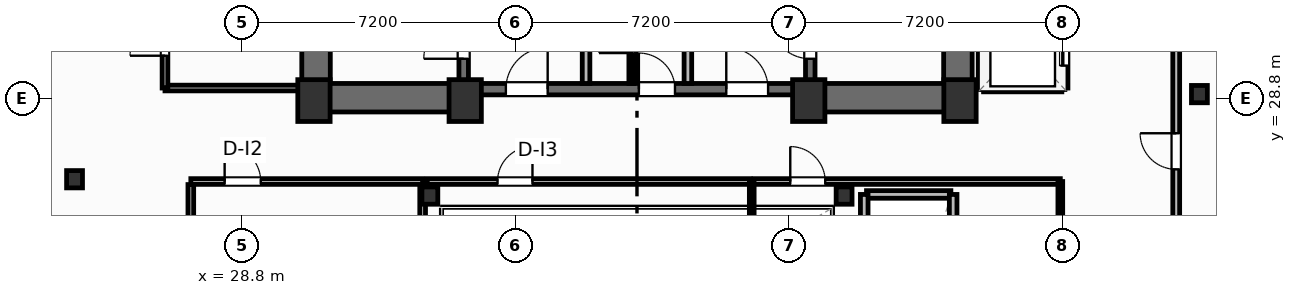
"""IFC4 building model, lengths in metres.
Left out: names, types, materials, properties, quantities, classifications, styles, units other than length and angle.
Written with IfcOpenShell. Run it as: python <this file> out.ifc"""

import sys

from ifc_helpers import new_model, si_unit, direction, frame, frame_2d, origin, origin_2d, place, context, subcontext, project, spatial, rectangle, i_section, extrude, element, fill, save


model = new_model("IFC4")
c1 = context("Model", 3, precision=1e-05, world=origin(), true_north=direction((0.0, 1.0)))
c2 = subcontext(c1, "Body", "Model", "MODEL_VIEW")
j1 = project(units=[si_unit("LENGTHUNIT", "METRE"), si_unit("PLANEANGLEUNIT", "RADIAN")], contexts=[c1])
p1 = place(None, origin())
s1 = spatial("IfcSite", under=j1, at=p1, CompositionType="ELEMENT")
p2 = place(p1, origin())
s2 = spatial("IfcBuilding", under=s1, at=p2, CompositionType="ELEMENT")
p3 = place(p2, frame((0.0, 0.0, 158.7)))
s3 = spatial("IfcBuildingStorey", under=s2, at=p3, CompositionType="ELEMENT", Elevation=158.7)
for number, where, z_axis, x_axis in (
    (1, (30.7, 28.75, 0.0), (0.0, 0.0, 1.0), (1.0, 0.0, 0.0)),
    (2, (34.68, 28.75, 0.0), (0.0, 0.0, 1.0), (1.0, 0.0, 0.0)),
    (3, (43.72, 28.75, 0.0), (0.0, 0.0, 1.0), (1.0, 0.0, 0.0)),
    (4, (47.7, 28.75, 0.0), (0.0, 0.0, 1.0), (1.0, 0.0, 0.0)),
):
    element("IfcColumn", number, at=place(p3, frame(where, z_axis=z_axis, x_axis=x_axis)), inside=s3, PredefinedType="COLUMN", context=c2, shape_type="SweptSolid", body=[
        extrude(rectangle(XDim=0.85, YDim=1.1, at=origin_2d()), origin(), (0.0, 0.0, 1.0), 3.7),
    ])
for number, where, z_axis, x_axis in (
    (5, (33.75, 26.25, 0.0), (0.0, 0.0, 1.0), (1.0, 0.0, 0.0)),
    (6, (44.65, 26.25, 0.0), (0.0, 0.0, 1.0), (1.0, 0.0, 0.0)),
    (7, (24.4, 26.68, 0.0), (0.0, 0.0, 1.0), (1.0, 0.0, 0.0)),
    (8, (54.0, 28.92, 0.0), (0.0, 0.0, 1.0), (1.0, 0.0, 0.0)),
):
    element("IfcColumn", number, at=place(p3, frame(where, z_axis=z_axis, x_axis=x_axis)), inside=s3, PredefinedType="COLUMN", context=c2, shape_type="SweptSolid", body=[
        extrude(i_section(OverallWidth=0.418, OverallDepth=0.455, WebThickness=0.042, FlangeThickness=0.068, FilletRadius=0.025, at=origin_2d()), origin(), (0.0, 0.0, 1.0), 3.7),
    ])
for number, where, z_axis, x_axis in (
    (9, (30.755, 29.2, 0.0), (0.0, 0.0, 1.0), (0.0, 1.0, 0.0)),
    (10, (47.645, 29.2, 0.0), (0.0, 0.0, 1.0), (0.0, 1.0, 0.0)),
):
    element("IfcWall", number, at=place(p3, frame(where, z_axis=z_axis, x_axis=x_axis)), inside=s3, PredefinedType="SHEAR", context=c2, shape_type="SweptSolid", body=[
        extrude(rectangle(XDim=9.22, YDim=0.75, at=frame_2d((4.61, 0.0))), origin(), (0.0, 0.0, 1.0), 3.38),
    ])
p4 = place(p3, frame((30.38, 28.825, 0.0), z_axis=(0.0, 0.0, 1.0), x_axis=(1.0, 0.0, 0.0)))
e11 = element("IfcWall", 11, at=p4, inside=s3, PredefinedType="SHEAR", context=c2, shape_type="SweptSolid", body=[
    extrude(rectangle(XDim=4.42, YDim=0.75, at=frame_2d((2.21, 0.0))), origin(), (0.0, 0.0, 1.0), 3.38),
])
p5 = place(p3, frame((43.6, 28.825, 0.0), z_axis=(0.0, 0.0, 1.0), x_axis=(1.0, 0.0, 0.0)))
e12 = element("IfcWall", 12, at=p5, inside=s3, PredefinedType="SHEAR", context=c2, shape_type="SweptSolid", body=[
    extrude(rectangle(XDim=4.42, YDim=0.75, at=frame_2d((2.21, 0.0))), origin(), (0.0, 0.0, 1.0), 3.38),
])
p6 = place(p3, frame((34.8, 29.05, 0.0), z_axis=(0.0, 0.0, 1.0), x_axis=(1.0, 0.0, 0.0)))
e13 = element("IfcWall", 13, at=p6, inside=s3, PredefinedType="SHEAR", context=c2, shape_type="SweptSolid", body=[
    extrude(rectangle(XDim=8.8, YDim=0.3, at=frame_2d((4.4, 0.0))), origin(), (0.0, 0.0, 1.0), 3.38),
])
p7 = place(p6, frame((0.95, 0.0, 0.0)))
e14 = element("IfcOpeningElement", 14, at=p7, cuts=e13, PredefinedType="OPENING", context=c2, shape_type="SweptSolid", body=[
    extrude(rectangle(XDim=1.1, YDim=2.15, at=frame_2d((0.55, 1.075))), frame((0.0, 0.16, 0.0), z_axis=(0.0, -1.0, 0.0), x_axis=(1.0, 0.0, 0.0)), (0.0, 0.0, 1.0), 0.32),
])
p8 = place(p6, frame((6.75, 0.0, 0.0)))
e15 = element("IfcOpeningElement", 15, at=p8, cuts=e13, PredefinedType="OPENING", context=c2, shape_type="SweptSolid", body=[
    extrude(rectangle(XDim=1.1, YDim=2.15, at=frame_2d((0.55, 1.075))), frame((0.0, 0.16, 0.0), z_axis=(0.0, -1.0, 0.0), x_axis=(1.0, 0.0, 0.0)), (0.0, 0.0, 1.0), 0.32),
])
p9 = place(p6, frame((4.45, 0.0, 0.0)))
e16 = element("IfcOpeningElement", 16, at=p9, cuts=e13, PredefinedType="OPENING", context=c2, shape_type="SweptSolid", body=[
    extrude(rectangle(XDim=0.95, YDim=2.15, at=frame_2d((0.475, 1.075))), frame((0.0, 0.16, 0.0), z_axis=(0.0, -1.0, 0.0), x_axis=(1.0, 0.0, 0.0)), (0.0, 0.0, 1.0), 0.32),
])
p10 = place(p3, frame((34.64, 29.2, 0.0), z_axis=(0.0, 0.0, 1.0), x_axis=(0.0, 1.0, 0.0)))
e17 = element("IfcWall", 17, at=p10, inside=s3, PredefinedType="SHEAR", context=c2, shape_type="SweptSolid", body=[
    extrude(rectangle(XDim=9.22, YDim=0.25, at=frame_2d((4.61, 0.0))), origin(), (0.0, 0.0, 1.0), 3.38),
])
p11 = place(p10, frame((0.65, 0.0, 0.0)))
e18 = element("IfcOpeningElement", 18, at=p11, cuts=e17, PredefinedType="OPENING", context=c2, shape_type="SweptSolid", body=[
    extrude(rectangle(XDim=1.05, YDim=2.15, at=frame_2d((0.525, 1.075))), frame((0.0, 0.135, 0.0), z_axis=(0.0, -1.0, 0.0), x_axis=(1.0, 0.0, 0.0)), (0.0, 0.0, 1.0), 0.27),
])
p12 = place(p3, frame((43.76, 29.2, 0.0), z_axis=(0.0, 0.0, 1.0), x_axis=(0.0, 1.0, 0.0)))
e19 = element("IfcWall", 19, at=p12, inside=s3, PredefinedType="SHEAR", context=c2, shape_type="SweptSolid", body=[
    extrude(rectangle(XDim=9.22, YDim=0.25, at=frame_2d((4.61, 0.0))), origin(), (0.0, 0.0, 1.0), 3.38),
])
p13 = place(p12, frame((0.65, 0.0, 0.0)))
e20 = element("IfcOpeningElement", 20, at=p13, cuts=e19, PredefinedType="OPENING", context=c2, shape_type="SweptSolid", body=[
    extrude(rectangle(XDim=1.05, YDim=2.15, at=frame_2d((0.525, 1.075))), frame((0.0, 0.135, 0.0), z_axis=(0.0, -1.0, 0.0), x_axis=(1.0, 0.0, 0.0)), (0.0, 0.0, 1.0), 0.27),
])
p14 = place(p3, frame((33.68, 26.62, 0.0), z_axis=(0.0, 0.0, 1.0), x_axis=(1.0, 0.0, 0.0)))
e21 = element("IfcWall", 21, at=p14, inside=s3, PredefinedType="PARTITIONING", context=c2, shape_type="SweptSolid", body=[
    extrude(rectangle(XDim=8.5, YDim=0.15, at=frame_2d((4.25, 0.0))), origin(), (0.0, 0.0, 1.0), 3.38),
])
p15 = place(p14, frame((1.85, 0.0, 0.0)))
e22 = element("IfcOpeningElement", 22, at=p15, cuts=e21, PredefinedType="OPENING", context=c2, shape_type="SweptSolid", body=[
    extrude(rectangle(XDim=0.92, YDim=2.05, at=frame_2d((0.46, 1.025))), frame((0.0, 0.085, 0.0), z_axis=(0.0, -1.0, 0.0), x_axis=(1.0, 0.0, 0.0)), (0.0, 0.0, 1.0), 0.17),
])
p16 = place(p3, frame((42.22, 19.32, 0.0), z_axis=(0.0, 0.0, 1.0), x_axis=(0.0, 1.0, 0.0)))
e23 = element("IfcWall", 23, at=p16, inside=s3, PredefinedType="PARTITIONING", context=c2, shape_type="SweptSolid", body=[
    extrude(rectangle(XDim=7.3, YDim=0.125, at=frame_2d((3.65, 0.0))), origin(), (0.0, 0.0, 1.0), 3.38),
])
p17 = place(p3, frame((42.28, 26.62, 0.0), z_axis=(0.0, 0.0, 1.0), x_axis=(1.0, 0.0, 0.0)))
e24 = element("IfcWall", 24, at=p17, inside=s3, PredefinedType="PARTITIONING", context=c2, shape_type="SweptSolid", body=[
    extrude(rectangle(XDim=8.06, YDim=0.15, at=frame_2d((4.03, 0.0))), origin(), (0.0, 0.0, 1.0), 3.38),
])
p18 = place(p17, frame((0.954, 0.0, 0.0)))
e25 = element("IfcOpeningElement", 25, at=p18, cuts=e24, PredefinedType="OPENING", context=c2, shape_type="SweptSolid", body=[
    extrude(rectangle(XDim=0.92, YDim=2.05, at=frame_2d((0.46, 1.025))), frame((0.0, 0.085, 0.0), z_axis=(0.0, -1.0, 0.0), x_axis=(1.0, 0.0, 0.0)), (0.0, 0.0, 1.0), 0.17),
])
p19 = place(p3, frame((50.34, 19.32, 0.0), z_axis=(0.0, 0.0, 1.0), x_axis=(0.0, 1.0, 0.0)))
e26 = element("IfcWall", 26, at=p19, inside=s3, PredefinedType="PARTITIONING", context=c2, shape_type="SweptSolid", body=[
    extrude(rectangle(XDim=7.3, YDim=0.125, at=frame_2d((3.65, 0.0))), origin(), (0.0, 0.0, 1.0), 3.38),
])
p20 = place(p3, frame((53.39, 19.24, 0.0), z_axis=(0.0, 0.0, 1.0), x_axis=(0.0, 1.0, 0.0)))
e27 = element("IfcWall", 27, at=p20, inside=s3, PredefinedType="PARTITIONING", context=c2, shape_type="SweptSolid", body=[
    extrude(rectangle(XDim=20.06, YDim=0.18, at=frame_2d((10.03, 0.0))), origin(), (0.0, 0.0, 1.0), 3.38),
])
p21 = place(p20, frame((7.7, 0.0, 0.0)))
e28 = element("IfcOpeningElement", 28, at=p21, cuts=e27, PredefinedType="OPENING", context=c2, shape_type="SweptSolid", body=[
    extrude(rectangle(XDim=0.95, YDim=2.05, at=frame_2d((0.475, 1.025))), frame((0.0, 0.1, 0.0), z_axis=(0.0, -1.0, 0.0), x_axis=(1.0, 0.0, 0.0)), (0.0, 0.0, 1.0), 0.2),
])
for number, where, z_axis, x_axis in (
    (29, (37.86, 29.2, 0.0), (0.0, 0.0, 1.0), (0.0, 1.0, 0.0)),
    (30, (40.54, 29.2, 0.0), (0.0, 0.0, 1.0), (0.0, 1.0, 0.0)),
):
    element("IfcWall", number, at=place(p3, frame(where, z_axis=z_axis, x_axis=x_axis)), inside=s3, PredefinedType="PARTITIONING", context=c2, shape_type="SweptSolid", body=[
        extrude(rectangle(XDim=5.18, YDim=0.2, at=frame_2d((2.59, 0.0))), origin(), (0.0, 0.0, 1.0), 3.38),
    ])
p22 = place(p3, frame((39.05, 29.2, 0.0), z_axis=(0.0, 0.0, 1.0), x_axis=(0.0, 1.0, 0.0)))
e31 = element("IfcWall", 31, at=p22, inside=s3, PredefinedType="PARTITIONING", context=c2, shape_type="SweptSolid", body=[
    extrude(rectangle(XDim=5.22, YDim=0.125, at=frame_2d((2.61, 0.0))), origin(), (0.0, 0.0, 1.0), 3.38),
])
p23 = place(p22, frame((0.8, 0.0, 0.0)))
e32 = element("IfcOpeningElement", 32, at=p23, cuts=e31, PredefinedType="OPENING", context=c2, shape_type="SweptSolid", body=[
    extrude(rectangle(XDim=0.85, YDim=2.05, at=frame_2d((0.425, 1.025))), frame((0.0, 0.073, 0.0), z_axis=(0.0, -1.0, 0.0), x_axis=(1.0, 0.0, 0.0)), (0.0, 0.0, 1.0), 0.145),
])
p24 = place(p22, frame((3.4, 0.0, 0.0)))
e33 = element("IfcOpeningElement", 33, at=p24, cuts=e31, PredefinedType="OPENING", context=c2, shape_type="SweptSolid", body=[
    extrude(rectangle(XDim=0.85, YDim=2.05, at=frame_2d((0.425, 1.025))), frame((0.0, 0.073, 0.0), z_axis=(0.0, -1.0, 0.0), x_axis=(1.0, 0.0, 0.0)), (0.0, 0.0, 1.0), 0.145),
])
p25 = place(p3, frame((27.46, 26.62, 0.0), z_axis=(0.0, 0.0, 1.0), x_axis=(1.0, 0.0, 0.0)))
e34 = element("IfcWall", 34, at=p25, inside=s3, PredefinedType="PARTITIONING", context=c2, shape_type="SweptSolid", body=[
    extrude(rectangle(XDim=6.1, YDim=0.15, at=frame_2d((3.05, 0.0))), origin(), (0.0, 0.0, 1.0), 2.592),
])
p26 = place(p25, frame((0.89, 0.0, 0.0)))
e35 = element("IfcOpeningElement", 35, at=p26, cuts=e34, PredefinedType="OPENING", context=c2, shape_type="SweptSolid", body=[
    extrude(rectangle(XDim=0.95, YDim=2.05, at=frame_2d((0.475, 1.025))), frame((0.0, 0.085, 0.0), z_axis=(0.0, -1.0, 0.0), x_axis=(1.0, 0.0, 0.0)), (0.0, 0.0, 1.0), 0.17),
])
p27 = place(p3, frame((27.46, 19.38, 0.0), z_axis=(0.0, 0.0, 1.0), x_axis=(0.0, 1.0, 0.0)))
e36 = element("IfcWall", 36, at=p27, inside=s3, PredefinedType="PARTITIONING", context=c2, shape_type="SweptSolid", body=[
    extrude(rectangle(XDim=7.16, YDim=0.15, at=frame_2d((3.58, 0.0))), origin(), (0.0, 0.0, 1.0), 3.38),
])
p28 = place(p27, frame((1.1, 0.0, 0.0)))
e37 = element("IfcOpeningElement", 37, at=p28, cuts=e36, PredefinedType="OPENING", context=c2, shape_type="SweptSolid", body=[
    extrude(rectangle(XDim=0.9, YDim=2.05, at=frame_2d((0.45, 1.025))), frame((0.0, 0.085, 0.0), z_axis=(0.0, -1.0, 0.0), x_axis=(1.0, 0.0, 0.0)), (0.0, 0.0, 1.0), 0.17),
])
p29 = place(p3, frame((33.56, 19.38, 0.0), z_axis=(0.0, 0.0, 1.0), x_axis=(0.0, 1.0, 0.0)))
e38 = element("IfcWall", 38, at=p29, inside=s3, PredefinedType="PARTITIONING", context=c2, shape_type="SweptSolid", body=[
    extrude(rectangle(XDim=7.16, YDim=0.15, at=frame_2d((3.58, 0.0))), origin(), (0.0, 0.0, 1.0), 2.754),
])
p30 = place(p3, frame((26.78, 29.08, 0.0), z_axis=(0.0, 0.0, 1.0), x_axis=(1.0, 0.0, 0.0)))
e39 = element("IfcWall", 39, at=p30, inside=s3, PredefinedType="PARTITIONING", context=c2, shape_type="SweptSolid", body=[
    extrude(rectangle(XDim=3.6, YDim=0.15, at=frame_2d((1.8, 0.0))), origin(), (0.0, 0.0, 1.0), 3.38),
])
p31 = place(p3, frame((26.78, 29.08, 0.0), z_axis=(0.0, 0.0, 1.0), x_axis=(0.0, 1.0, 0.0)))
e40 = element("IfcWall", 40, at=p31, inside=s3, PredefinedType="PARTITIONING", context=c2, shape_type="SweptSolid", body=[
    extrude(rectangle(XDim=5.87, YDim=0.15, at=frame_2d((2.935, 0.0))), origin(), (0.0, 0.0, 1.0), 3.38),
])
p32 = place(p31, frame((0.85, 0.0, 0.0)))
e41 = element("IfcOpeningElement", 41, at=p32, cuts=e40, PredefinedType="OPENING", context=c2, shape_type="SweptSolid", body=[
    extrude(rectangle(XDim=0.92, YDim=2.05, at=frame_2d((0.46, 1.025))), frame((0.0, 0.085, 0.0), z_axis=(0.0, -1.0, 0.0), x_axis=(1.0, 0.0, 0.0)), (0.0, 0.0, 1.0), 0.17),
])
p33 = place(p31, frame((3.45, 0.0, 0.0)))
e42 = element("IfcOpeningElement", 42, at=p33, cuts=e40, PredefinedType="OPENING", context=c2, shape_type="SweptSolid", body=[
    extrude(rectangle(XDim=0.85, YDim=2.05, at=frame_2d((0.425, 1.025))), frame((0.0, 0.085, 0.0), z_axis=(0.0, -1.0, 0.0), x_axis=(1.0, 0.0, 0.0)), (0.0, 0.0, 1.0), 0.17),
])
p34 = place(p3, frame((48.32, 29.08, 0.0), z_axis=(0.0, 0.0, 1.0), x_axis=(1.0, 0.0, 0.0)))
e43 = element("IfcWall", 43, at=p34, inside=s3, PredefinedType="PARTITIONING", context=c2, shape_type="SweptSolid", body=[
    extrude(rectangle(XDim=2.06, YDim=0.2, at=frame_2d((1.03, 0.0))), origin(), (0.0, 0.0, 1.0), 2.592),
])
p35 = place(p3, frame((48.28, 29.08, 0.0), z_axis=(0.0, 0.0, 1.0), x_axis=(0.0, 1.0, 0.0)))
e44 = element("IfcWall", 44, at=p35, inside=s3, PredefinedType="PARTITIONING", context=c2, shape_type="SweptSolid", body=[
    extrude(rectangle(XDim=6.89, YDim=0.2, at=frame_2d((3.445, 0.0))), origin(), (0.0, 0.0, 1.0), 3.38),
])
p36 = place(p3, frame((50.44, 29.08, 0.0), z_axis=(0.0, 0.0, 1.0), x_axis=(0.0, 1.0, 0.0)))
e45 = element("IfcWall", 45, at=p36, inside=s3, PredefinedType="PARTITIONING", context=c2, shape_type="SweptSolid", body=[
    extrude(rectangle(XDim=6.89, YDim=0.2, at=frame_2d((3.445, 0.0))), origin(), (0.0, 0.0, 1.0), 3.38),
])
p37 = place(p36, frame((0.59, 0.0, 0.0)))
e46 = element("IfcOpeningElement", 46, at=p37, cuts=e45, PredefinedType="OPENING", context=c2, shape_type="SweptSolid", body=[
    extrude(rectangle(XDim=1.1, YDim=2.15, at=frame_2d((0.55, 1.075))), frame((0.0, 0.11, 0.0), z_axis=(0.0, -1.0, 0.0), x_axis=(1.0, 0.0, 0.0)), (0.0, 0.0, 1.0), 0.22),
])
p38 = place(p36, frame((2.89, 0.0, 0.0)))
e47 = element("IfcOpeningElement", 47, at=p38, cuts=e45, PredefinedType="OPENING", context=c2, shape_type="SweptSolid", body=[
    extrude(rectangle(XDim=1.1, YDim=2.15, at=frame_2d((0.55, 1.075))), frame((0.0, 0.11, 0.0), z_axis=(0.0, -1.0, 0.0), x_axis=(1.0, 0.0, 0.0)), (0.0, 0.0, 1.0), 0.22),
])
p39 = place(p36, frame((5.19, 0.0, 0.0)))
e48 = element("IfcOpeningElement", 48, at=p39, cuts=e45, PredefinedType="OPENING", context=c2, shape_type="SweptSolid", body=[
    extrude(rectangle(XDim=1.1, YDim=2.15, at=frame_2d((0.55, 1.075))), frame((0.0, 0.11, 0.0), z_axis=(0.0, -1.0, 0.0), x_axis=(1.0, 0.0, 0.0)), (0.0, 0.0, 1.0), 0.22),
])
p40 = place(p3, frame((45.24, 26.28, 0.0), z_axis=(0.0, 0.0, 1.0), x_axis=(1.0, 0.0, 0.0)))
e49 = element("IfcWall", 49, at=p40, inside=s3, PredefinedType="PARTITIONING", context=c2, shape_type="SweptSolid", body=[
    extrude(rectangle(XDim=2.22, YDim=0.2, at=frame_2d((1.11, 0.0))), origin(), (0.0, 0.0, 1.0), 3.38),
])
for number, where, z_axis, x_axis in (
    (50, (45.18, 19.38, 0.0), (0.0, 0.0, 1.0), (0.0, 1.0, 0.0)),
    (51, (47.52, 19.38, 0.0), (0.0, 0.0, 1.0), (0.0, 1.0, 0.0)),
):
    element("IfcWall", number, at=place(p3, frame(where, z_axis=z_axis, x_axis=x_axis)), inside=s3, PredefinedType="PARTITIONING", context=c2, shape_type="SweptSolid", body=[
        extrude(rectangle(XDim=6.9, YDim=0.2, at=frame_2d((3.45, 0.0))), origin(), (0.0, 0.0, 1.0), 3.38),
    ])
p41 = place(p15, origin())
e52 = element("IfcDoor", 52, at=p41, inside=s3, OperationType="SINGLE_SWING_RIGHT", PredefinedType="DOOR", context=c2, shape_type="SweptSolid", body=[
    extrude(rectangle(XDim=0.92, YDim=2.05, at=frame_2d((0.46, 1.025))), frame((0.0, 0.025, 0.0), z_axis=(0.0, -1.0, 0.0), x_axis=(1.0, 0.0, 0.0)), (0.0, 0.0, 1.0), 0.05),
])
fill(e22, e52)
p42 = place(p18, origin())
e53 = element("IfcDoor", 53, at=p42, inside=s3, OperationType="SINGLE_SWING_LEFT", PredefinedType="DOOR", context=c2, shape_type="SweptSolid", body=[
    extrude(rectangle(XDim=0.92, YDim=2.05, at=frame_2d((0.46, 1.025))), frame((0.0, 0.025, 0.0), z_axis=(0.0, -1.0, 0.0), x_axis=(1.0, 0.0, 0.0)), (0.0, 0.0, 1.0), 0.05),
])
fill(e25, e53)
p43 = place(p21, origin())
e54 = element("IfcDoor", 54, at=p43, inside=s3, OperationType="SINGLE_SWING_RIGHT", PredefinedType="DOOR", context=c2, shape_type="SweptSolid", body=[
    extrude(rectangle(XDim=0.95, YDim=2.05, at=frame_2d((0.475, 1.025))), frame((0.0, 0.025, 0.0), z_axis=(0.0, -1.0, 0.0), x_axis=(1.0, 0.0, 0.0)), (0.0, 0.0, 1.0), 0.05),
])
fill(e28, e54)
p44 = place(p11, origin())
e55 = element("IfcDoor", 55, at=p44, inside=s3, OperationType="SINGLE_SWING_LEFT", PredefinedType="DOOR", context=c2, shape_type="SweptSolid", body=[
    extrude(rectangle(XDim=1.05, YDim=2.15, at=frame_2d((0.525, 1.075))), frame((0.0, 0.025, 0.0), z_axis=(0.0, -1.0, 0.0), x_axis=(1.0, 0.0, 0.0)), (0.0, 0.0, 1.0), 0.05),
])
fill(e18, e55)
p45 = place(p13, origin())
e56 = element("IfcDoor", 56, at=p45, inside=s3, OperationType="SINGLE_SWING_RIGHT", PredefinedType="DOOR", context=c2, shape_type="SweptSolid", body=[
    extrude(rectangle(XDim=1.05, YDim=2.15, at=frame_2d((0.525, 1.075))), frame((0.0, 0.025, 0.0), z_axis=(0.0, -1.0, 0.0), x_axis=(1.0, 0.0, 0.0)), (0.0, 0.0, 1.0), 0.05),
])
fill(e20, e56)
p46 = place(p7, origin())
e57 = element("IfcDoor", 57, at=p46, inside=s3, OperationType="SINGLE_SWING_RIGHT", PredefinedType="DOOR", context=c2, shape_type="SweptSolid", body=[
    extrude(rectangle(XDim=1.1, YDim=2.15, at=frame_2d((0.55, 1.075))), frame((0.0, 0.025, 0.0), z_axis=(0.0, -1.0, 0.0), x_axis=(1.0, 0.0, 0.0)), (0.0, 0.0, 1.0), 0.05),
])
fill(e14, e57)
p47 = place(p8, origin())
e58 = element("IfcDoor", 58, at=p47, inside=s3, OperationType="SINGLE_SWING_LEFT", PredefinedType="DOOR", context=c2, shape_type="SweptSolid", body=[
    extrude(rectangle(XDim=1.1, YDim=2.15, at=frame_2d((0.55, 1.075))), frame((0.0, 0.025, 0.0), z_axis=(0.0, -1.0, 0.0), x_axis=(1.0, 0.0, 0.0)), (0.0, 0.0, 1.0), 0.05),
])
fill(e15, e58)
p48 = place(p23, origin())
e59 = element("IfcDoor", 59, at=p48, inside=s3, OperationType="SINGLE_SWING_LEFT", PredefinedType="DOOR", context=c2, shape_type="SweptSolid", body=[
    extrude(rectangle(XDim=0.85, YDim=2.05, at=frame_2d((0.425, 1.025))), frame((0.0, 0.025, 0.0), z_axis=(0.0, -1.0, 0.0), x_axis=(1.0, 0.0, 0.0)), (0.0, 0.0, 1.0), 0.05),
])
fill(e32, e59)
p49 = place(p9, origin())
e60 = element("IfcDoor", 60, at=p49, inside=s3, OperationType="SINGLE_SWING_LEFT", PredefinedType="DOOR", context=c2, shape_type="SweptSolid", body=[
    extrude(rectangle(XDim=0.95, YDim=2.15, at=frame_2d((0.475, 1.075))), frame((0.0, 0.025, 0.0), z_axis=(0.0, -1.0, 0.0), x_axis=(1.0, 0.0, 0.0)), (0.0, 0.0, 1.0), 0.05),
])
fill(e16, e60)
p50 = place(p26, origin())
e61 = element("IfcDoor", 61, at=p50, inside=s3, OperationType="SINGLE_SWING_LEFT", PredefinedType="DOOR", context=c2, shape_type="SweptSolid", body=[
    extrude(rectangle(XDim=0.95, YDim=2.05, at=frame_2d((0.475, 1.025))), frame((0.0, 0.025, 0.0), z_axis=(0.0, -1.0, 0.0), x_axis=(1.0, 0.0, 0.0)), (0.0, 0.0, 1.0), 0.05),
])
fill(e35, e61)
p51 = place(p32, origin())
e62 = element("IfcDoor", 62, at=p51, inside=s3, OperationType="SINGLE_SWING_LEFT", PredefinedType="DOOR", context=c2, shape_type="SweptSolid", body=[
    extrude(rectangle(XDim=0.92, YDim=2.05, at=frame_2d((0.46, 1.025))), frame((0.0, 0.025, 0.0), z_axis=(0.0, -1.0, 0.0), x_axis=(1.0, 0.0, 0.0)), (0.0, 0.0, 1.0), 0.05),
])
fill(e41, e62)
p52 = place(p37, origin())
e63 = element("IfcDoor", 63, at=p52, inside=s3, OperationType="SLIDING_TO_LEFT", PredefinedType="DOOR", context=c2, shape_type="SweptSolid", body=[
    extrude(rectangle(XDim=1.1, YDim=2.15, at=frame_2d((0.55, 1.075))), frame((0.0, 0.025, 0.0), z_axis=(0.0, -1.0, 0.0), x_axis=(1.0, 0.0, 0.0)), (0.0, 0.0, 1.0), 0.05),
])
fill(e46, e63)
save(model, sys.argv[1])
